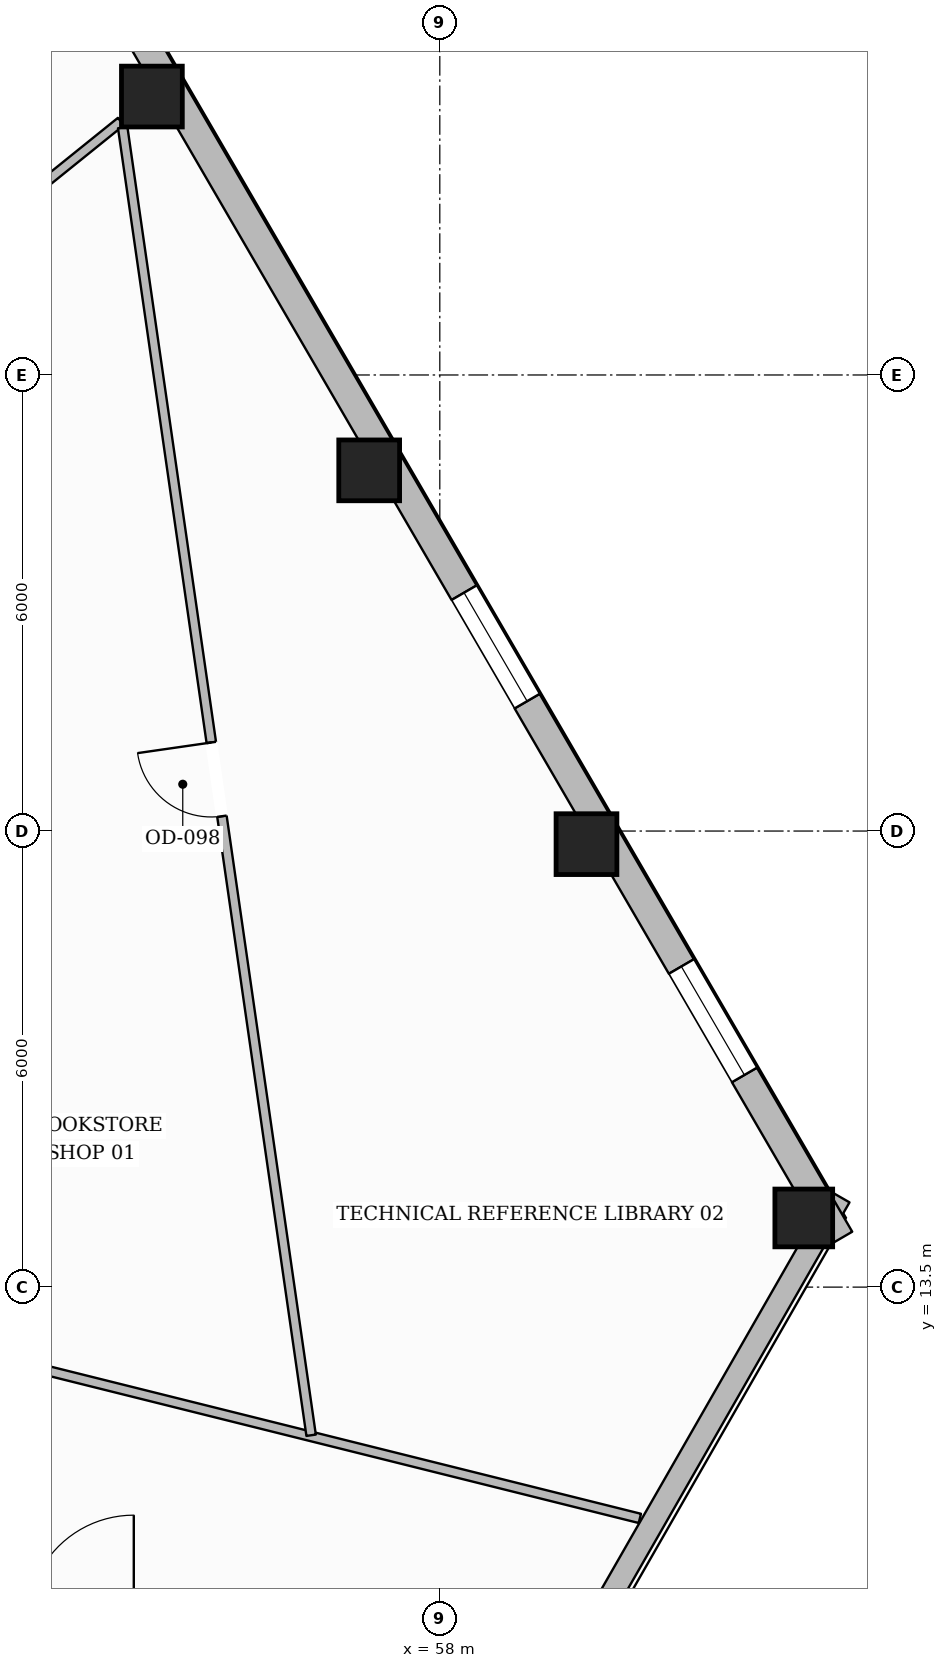
"""IFC4 building model, lengths in metres.
Left out: names, types, materials, properties, quantities, classifications, styles, units other than length and angle.
Written with IfcOpenShell. Run it as: python <this file> out.ifc"""

import sys

from ifc_helpers import new_model, si_unit, direction, frame, frame_2d, origin, origin_2d, place, context, subcontext, project, spatial, rectangle, hollow_rectangle, extrude, element, fill, save


model = new_model("IFC4")
c1 = context("Model", 3, precision=1e-05, world=origin(), true_north=direction((0.0, 1.0)))
c2 = subcontext(c1, "Body", "Model", "MODEL_VIEW")
j1 = project(units=[si_unit("LENGTHUNIT", "METRE"), si_unit("PLANEANGLEUNIT", "RADIAN")], contexts=[c1])
p1 = place(None, origin())
s1 = spatial("IfcSite", under=j1, at=p1, CompositionType="ELEMENT")
p2 = place(p1, origin())
s2 = spatial("IfcBuilding", under=s1, at=p2, CompositionType="ELEMENT")
p3 = place(p2, frame((0.0, 0.0, 44.5)))
s3 = spatial("IfcBuildingStorey", under=s2, at=p3, CompositionType="ELEMENT", Elevation=44.5)
p4 = place(p3, frame((62.789, 14.41, 0.0), z_axis=(0.0, 0.0, 1.0), x_axis=(1.0, 0.0, 0.0)))
e1 = element("IfcColumn", 1, at=p4, inside=s3, PredefinedType="COLUMN", context=c2, shape_type="SweptSolid", body=[
    extrude(hollow_rectangle(XDim=0.76, YDim=0.76, WallThickness=0.035, at=origin_2d()), origin(), (0.0, 0.0, 1.0), 3.59),
])
for number, where, z_axis, x_axis in (
    (2, (59.93, 19.328, 0.0), (0.0, 0.0, 1.0), (1.0, 0.0, 0.0)),
    (3, (57.071, 24.245, 0.0), (0.0, 0.0, 1.0), (1.0, 0.0, 0.0)),
    (4, (54.212, 29.163, 0.0), (0.0, 0.0, 1.0), (1.0, 0.0, 0.0)),
):
    element("IfcColumn", number, at=place(p3, frame(where, z_axis=z_axis, x_axis=x_axis)), inside=s3, PredefinedType="COLUMN", context=c2, shape_type="SweptSolid", body=[
        extrude(hollow_rectangle(XDim=0.8, YDim=0.8, WallThickness=0.036, at=origin_2d()), origin(), (0.0, 0.0, 1.0), 3.59),
    ])
p5 = place(p3, frame((63.26, 14.69, 0.0), z_axis=(0.0, 0.0, 1.0), x_axis=(-0.497393616325, -0.867524979721, 0.0)))
e5 = element("IfcWall", 5, at=p5, inside=s3, PredefinedType="STANDARD", context=c2, shape_type="SweptSolid", body=[
    extrude(rectangle(XDim=15.982, YDim=0.3, at=frame_2d((7.991, 0.0))), origin(), (0.0, 0.0, 1.0), 2.97),
])
p6 = place(p5, frame((7.391, 0.0, 0.65)))
e6 = element("IfcOpeningElement", 6, at=p6, cuts=e5, PredefinedType="OPENING", context=c2, shape_type="SweptSolid", body=[
    extrude(rectangle(XDim=1.2, YDim=1.7, at=frame_2d((0.6, 0.85))), frame((0.0, 0.16, 0.0), z_axis=(0.0, -1.0, 0.0), x_axis=(1.0, 0.0, 0.0)), (0.0, 0.0, 1.0), 0.32),
])
p7 = place(p3, frame((45.631, 44.462, 0.0), z_axis=(0.0, 0.0, 1.0), x_axis=(0.502579693438, -0.864530885362, 0.0)))
e7 = element("IfcWall", 7, at=p7, inside=s3, PredefinedType="STANDARD", context=c2, shape_type="SweptSolid", body=[
    extrude(rectangle(XDim=35.081, YDim=0.38, at=frame_2d((17.541, 0.0))), origin(), (0.0, 0.0, 1.0), 2.97),
])
p8 = place(p7, frame((30.935, 0.0, 0.65)))
e8 = element("IfcOpeningElement", 8, at=p8, cuts=e7, PredefinedType="OPENING", context=c2, shape_type="SweptSolid", body=[
    extrude(rectangle(XDim=1.65, YDim=1.75, at=frame_2d((0.825, 0.875))), frame((0.0, 0.2, 0.0), z_axis=(0.0, -1.0, 0.0), x_axis=(1.0, 0.0, 0.0)), (0.0, 0.0, 1.0), 0.4),
])
p9 = place(p7, frame((25.246, 0.0, 0.65)))
e9 = element("IfcOpeningElement", 9, at=p9, cuts=e7, PredefinedType="OPENING", context=c2, shape_type="SweptSolid", body=[
    extrude(rectangle(XDim=1.65, YDim=1.75, at=frame_2d((0.825, 0.875))), frame((0.0, 0.2, 0.0), z_axis=(0.0, -1.0, 0.0), x_axis=(1.0, 0.0, 0.0)), (0.0, 0.0, 1.0), 0.4),
])
p10 = place(p7, frame((13.87, 0.0, 0.65)))
e10 = element("IfcOpeningElement", 10, at=p10, cuts=e7, PredefinedType="OPENING", context=c2, shape_type="SweptSolid", body=[
    extrude(rectangle(XDim=1.65, YDim=1.75, at=frame_2d((0.825, 0.875))), frame((0.0, 0.2, 0.0), z_axis=(0.0, -1.0, 0.0), x_axis=(1.0, 0.0, 0.0)), (0.0, 0.0, 1.0), 0.4),
])
p11 = place(p7, frame((8.182, 0.0, 0.65)))
e11 = element("IfcOpeningElement", 11, at=p11, cuts=e7, PredefinedType="OPENING", context=c2, shape_type="SweptSolid", body=[
    extrude(rectangle(XDim=1.65, YDim=1.75, at=frame_2d((0.825, 0.875))), frame((0.0, 0.2, 0.0), z_axis=(0.0, -1.0, 0.0), x_axis=(1.0, 0.0, 0.0)), (0.0, 0.0, 1.0), 0.4),
])
p12 = place(p7, frame((2.493, 0.0, 0.65)))
e12 = element("IfcOpeningElement", 12, at=p12, cuts=e7, PredefinedType="OPENING", context=c2, shape_type="SweptSolid", body=[
    extrude(rectangle(XDim=1.65, YDim=1.75, at=frame_2d((0.825, 0.875))), frame((0.0, 0.2, 0.0), z_axis=(0.0, -1.0, 0.0), x_axis=(1.0, 0.0, 0.0)), (0.0, 0.0, 1.0), 0.4),
])
p13 = place(p3, frame((49.27, 25.18, 0.0), z_axis=(0.0, 0.0, 1.0), x_axis=(0.778683923626, 0.627416406453, 0.0)))
e13 = element("IfcWall", 13, at=p13, inside=s3, PredefinedType="PARTITIONING", context=c2, shape_type="SweptSolid", body=[
    extrude(rectangle(XDim=5.823, YDim=0.125, at=frame_2d((2.912, 0.0))), origin(), (0.0, 0.0, 1.0), 3.057),
])
p14 = place(p3, frame((50.101, 13.083, 0.0), z_axis=(0.0, 0.0, 1.0), x_axis=(0.970294476974, -0.241926906221, 0.0)))
e14 = element("IfcWall", 14, at=p14, inside=s3, PredefinedType="PARTITIONING", context=c2, shape_type="SweptSolid", body=[
    extrude(rectangle(XDim=10.854, YDim=0.125, at=frame_2d((5.427, 0.0))), origin(), (0.0, 0.0, 1.0), 3.59),
])
p15 = place(p3, frame((56.307, 11.551, 0.0), z_axis=(0.0, 0.0, 1.0), x_axis=(-0.142608983758, 0.989779105534, 0.0)))
e15 = element("IfcWall", 15, at=p15, inside=s3, PredefinedType="PARTITIONING", context=c2, shape_type="SweptSolid", body=[
    extrude(rectangle(XDim=17.382, YDim=0.125, at=frame_2d((8.691, 0.0))), origin(), (0.0, 0.0, 1.0), 3.278),
])
p16 = place(p15, frame((8.228, 0.0, 0.0)))
e16 = element("IfcOpeningElement", 16, at=p16, cuts=e15, PredefinedType="OPENING", context=c2, shape_type="SweptSolid", body=[
    extrude(rectangle(XDim=0.98, YDim=2.15, at=frame_2d((0.49, 1.075))), frame((0.0, 0.073, 0.0), z_axis=(0.0, -1.0, 0.0), x_axis=(1.0, 0.0, 0.0)), (0.0, 0.0, 1.0), 0.145),
])
p17 = place(p8, origin())
e17 = element("IfcWindow", 17, at=p17, inside=s3, PartitioningType="SINGLE_PANEL", PredefinedType="WINDOW", context=c2, shape_type="SweptSolid", body=[
    extrude(rectangle(XDim=1.65, YDim=1.75, at=frame_2d((0.825, 0.875))), frame((0.0, 0.03, 0.0), z_axis=(0.0, -1.0, 0.0), x_axis=(1.0, 0.0, 0.0)), (0.0, 0.0, 1.0), 0.06),
])
fill(e8, e17)
p18 = place(p9, origin())
e18 = element("IfcWindow", 18, at=p18, inside=s3, PartitioningType="SINGLE_PANEL", PredefinedType="WINDOW", context=c2, shape_type="SweptSolid", body=[
    extrude(rectangle(XDim=1.65, YDim=1.75, at=frame_2d((0.825, 0.875))), frame((0.0, 0.03, 0.0), z_axis=(0.0, -1.0, 0.0), x_axis=(1.0, 0.0, 0.0)), (0.0, 0.0, 1.0), 0.06),
])
fill(e9, e18)
p19 = place(p16, origin())
e19 = element("IfcDoor", 19, at=p19, inside=s3, OperationType="SINGLE_SWING_RIGHT", PredefinedType="DOOR", context=c2, shape_type="SweptSolid", body=[
    extrude(rectangle(XDim=0.98, YDim=2.15, at=frame_2d((0.49, 1.075))), frame((0.0, 0.025, 0.0), z_axis=(0.0, -1.0, 0.0), x_axis=(1.0, 0.0, 0.0)), (0.0, 0.0, 1.0), 0.05),
])
fill(e16, e19)
save(model, sys.argv[1])
